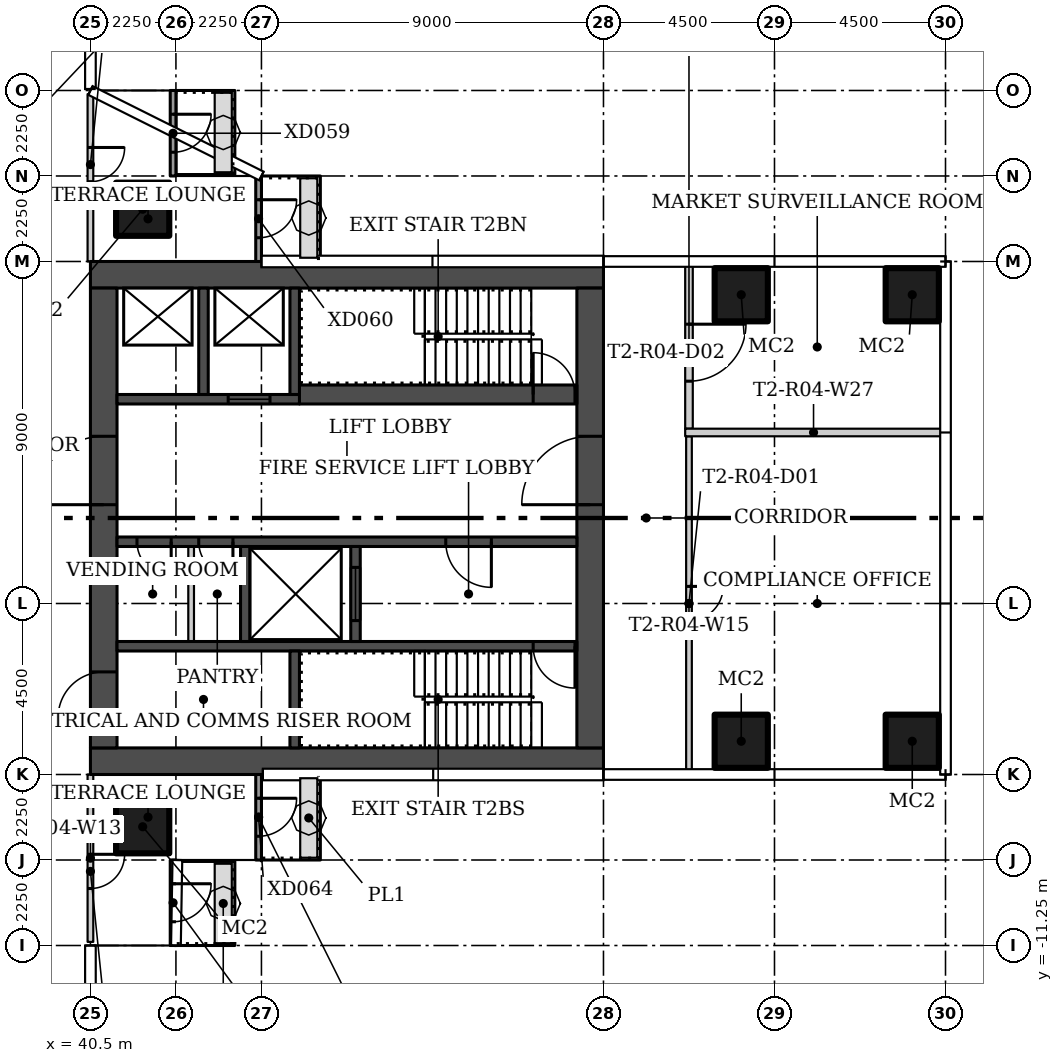
"""IFC4 building model, lengths in metres.
Left out: names, types, materials, properties, quantities, classifications, styles, units other than length and angle.
Written with IfcOpenShell. Run it as: python <this file> out.ifc"""

import sys

from ifc_helpers import new_model, si_unit, direction, frame, frame_2d, origin, origin_2d, place, context, subcontext, project, spatial, rectangle, hollow_rectangle, extrude, element, fill, save


model = new_model("IFC4")
c1 = context("Model", 3, precision=1e-05, world=origin(), true_north=direction((0.0, 1.0)))
c2 = subcontext(c1, "Body", "Model", "MODEL_VIEW")
j1 = project(units=[si_unit("LENGTHUNIT", "METRE"), si_unit("PLANEANGLEUNIT", "RADIAN")], contexts=[c1])
p1 = place(None, origin())
s1 = spatial("IfcSite", under=j1, at=p1, CompositionType="ELEMENT")
p2 = place(p1, origin())
s2 = spatial("IfcBuilding", under=s1, at=p2, CompositionType="ELEMENT")
p3 = place(p2, frame((0.0, 0.0, 49.8)))
s3 = spatial("IfcBuildingStorey", under=s2, at=p3, CompositionType="ELEMENT", Elevation=49.8)
for number, where in (
    (1, (41.875, 8.125, 0.0)),
    (2, (41.875, -8.125, 0.0)),
    (3, (57.625, -5.875, 0.0)),
    (4, (62.125, -5.875, 0.0)),
    (5, (57.625, 5.875, 0.0)),
    (6, (62.125, 5.875, 0.0)),
):
    element("IfcColumn", number, at=place(p3, frame(where)), inside=s3, PredefinedType="COLUMN", context=c2, shape_type="SweptSolid", body=[
        extrude(hollow_rectangle(XDim=1.4, YDim=1.4, WallThickness=0.05, at=origin_2d()), origin(), (0.0, 0.0, 1.0), 3.55),
    ])
p4 = place(p3, frame((40.5, -6.75, 0.0), z_axis=(0.0, 0.0, 1.0), x_axis=(0.0, -1.0, 0.0)))
e7 = element("IfcWall", 7, at=p4, inside=s3, PredefinedType="PARTITIONING", context=c2, shape_type="SweptSolid", body=[
    extrude(rectangle(XDim=4.405, YDim=0.15, at=frame_2d((2.203, 0.0))), origin(), (0.0, 0.0, 1.0), 3.55),
])
p5 = place(p4, frame((2.1, 0.0, 0.0)))
e8 = element("IfcOpeningElement", 8, at=p5, cuts=e7, PredefinedType="OPENING", context=c2, shape_type="SweptSolid", body=[
    extrude(rectangle(XDim=0.9, YDim=2.1, at=frame_2d((0.45, 1.05))), frame((0.0, 0.085, 0.0), z_axis=(0.0, -1.0, 0.0), x_axis=(1.0, 0.0, 0.0)), (0.0, 0.0, 1.0), 0.17),
])
p6 = place(p3, frame((40.5, 11.155, 0.0), z_axis=(0.0, 0.0, 1.0), x_axis=(0.0, -1.0, 0.0)))
e9 = element("IfcWall", 9, at=p6, inside=s3, PredefinedType="PARTITIONING", context=c2, shape_type="SweptSolid", body=[
    extrude(rectangle(XDim=4.405, YDim=0.15, at=frame_2d((2.203, 0.0))), origin(), (0.0, 0.0, 1.0), 3.55),
])
p7 = place(p6, frame((1.405, 0.0, 0.0)))
e10 = element("IfcOpeningElement", 10, at=p7, cuts=e9, PredefinedType="OPENING", context=c2, shape_type="SweptSolid", body=[
    extrude(rectangle(XDim=0.9, YDim=2.1, at=frame_2d((0.45, 1.05))), frame((0.0, 0.085, 0.0), z_axis=(0.0, -1.0, 0.0), x_axis=(1.0, 0.0, 0.0)), (0.0, 0.0, 1.0), 0.17),
])
p8 = place(p3, frame((56.25, 2.15, 0.0), z_axis=(0.0, 0.0, 1.0), x_axis=(0.0, -1.0, 0.0)))
e11 = element("IfcWall", 11, at=p8, inside=s3, PredefinedType="PARTITIONING", context=c2, shape_type="SweptSolid", body=[
    extrude(rectangle(XDim=8.805, YDim=0.15, at=frame_2d((4.402, 0.0))), origin(), (0.0, 0.0, 1.0), 3.55),
])
p9 = place(p8, frame((3.95, 0.0, 0.0)))
e12 = element("IfcOpeningElement", 12, at=p9, cuts=e11, PredefinedType="OPENING", context=c2, shape_type="SweptSolid", body=[
    extrude(rectangle(XDim=0.9, YDim=2.1, at=frame_2d((0.45, 1.05))), frame((0.0, 0.085, 0.0), z_axis=(0.0, -1.0, 0.0), x_axis=(1.0, 0.0, 0.0)), (0.0, 0.0, 1.0), 0.17),
])
p10 = place(p3, frame((56.25, 6.655, 0.0), z_axis=(0.0, 0.0, 1.0), x_axis=(0.0, -1.0, 0.0)))
e13 = element("IfcWall", 13, at=p10, inside=s3, PredefinedType="PARTITIONING", context=c2, shape_type="SweptSolid", body=[
    extrude(rectangle(XDim=4.305, YDim=0.2, at=frame_2d((2.152, 0.0))), origin(), (0.0, 0.0, 1.0), 3.55),
])
p11 = place(p10, frame((1.555, 0.0, 0.0)))
e14 = element("IfcOpeningElement", 14, at=p11, cuts=e13, PredefinedType="OPENING", context=c2, shape_type="SweptSolid", body=[
    extrude(rectangle(XDim=1.5, YDim=2.1, at=frame_2d((0.75, 1.05))), frame((0.0, 0.11, 0.0), z_axis=(0.0, -1.0, 0.0), x_axis=(1.0, 0.0, 0.0)), (0.0, 0.0, 1.0), 0.22),
])
p12 = place(p3, frame((62.905, 2.25, 0.0), z_axis=(0.0, 0.0, 1.0), x_axis=(-1.0, 0.0, 0.0)))
e15 = element("IfcWall", 15, at=p12, inside=s3, PredefinedType="PARTITIONING", context=c2, shape_type="SweptSolid", body=[
    extrude(rectangle(XDim=6.755, YDim=0.2, at=frame_2d((3.377, 0.0))), origin(), (0.0, 0.0, 1.0), 3.55),
])
p13 = place(p3, frame((42.675, 11.25, 0.0), z_axis=(0.0, 0.0, 1.0), x_axis=(0.0, -1.0, 0.0)))
e16 = element("IfcWall", 16, at=p13, inside=s3, PredefinedType="SOLIDWALL", context=c2, shape_type="SweptSolid", body=[
    extrude(rectangle(XDim=2.25, YDim=0.15, at=frame_2d((1.125, 0.0))), origin(), (0.0, 0.0, 1.0), 3.45),
])
p14 = place(p13, frame((0.625, 0.0, 0.0)))
e17 = element("IfcOpeningElement", 17, at=p14, cuts=e16, PredefinedType="OPENING", context=c2, shape_type="SweptSolid", body=[
    extrude(rectangle(XDim=1.0, YDim=2.4, at=frame_2d((0.5, 1.2))), frame((0.0, 0.085, 0.0), z_axis=(0.0, -1.0, 0.0), x_axis=(1.0, 0.0, 0.0)), (0.0, 0.0, 1.0), 0.17),
])
p15 = place(p3, frame((44.925, 9.0, 0.0), z_axis=(0.0, 0.0, 1.0), x_axis=(0.0, -1.0, 0.0)))
e18 = element("IfcWall", 18, at=p15, inside=s3, PredefinedType="SOLIDWALL", context=c2, shape_type="SweptSolid", body=[
    extrude(rectangle(XDim=2.257, YDim=0.15, at=frame_2d((1.128, 0.0))), origin(), (0.0, 0.0, 1.0), 3.45),
])
p16 = place(p15, frame((0.625, 0.0, 0.0)))
e19 = element("IfcOpeningElement", 19, at=p16, cuts=e18, PredefinedType="OPENING", context=c2, shape_type="SweptSolid", body=[
    extrude(rectangle(XDim=1.0, YDim=2.4, at=frame_2d((0.5, 1.2))), frame((0.0, 0.085, 0.0), z_axis=(0.0, -1.0, 0.0), x_axis=(1.0, 0.0, 0.0)), (0.0, 0.0, 1.0), 0.17),
])
p17 = place(p3, frame((42.675, -9.0, 0.0), z_axis=(0.0, 0.0, 1.0), x_axis=(0.0, -1.0, 0.0)))
e20 = element("IfcWall", 20, at=p17, inside=s3, PredefinedType="SOLIDWALL", context=c2, shape_type="SweptSolid", body=[
    extrude(rectangle(XDim=2.25, YDim=0.15, at=frame_2d((1.125, 0.0))), origin(), (0.0, 0.0, 1.0), 3.45),
])
p18 = place(p17, frame((0.625, 0.0, 0.0)))
e21 = element("IfcOpeningElement", 21, at=p18, cuts=e20, PredefinedType="OPENING", context=c2, shape_type="SweptSolid", body=[
    extrude(rectangle(XDim=1.0, YDim=2.4, at=frame_2d((0.5, 1.2))), frame((0.0, 0.085, 0.0), z_axis=(0.0, -1.0, 0.0), x_axis=(1.0, 0.0, 0.0)), (0.0, 0.0, 1.0), 0.17),
])
p19 = place(p3, frame((44.925, -6.743, 0.0), z_axis=(0.0, 0.0, 1.0), x_axis=(0.0, -1.0, 0.0)))
e22 = element("IfcWall", 22, at=p19, inside=s3, PredefinedType="SOLIDWALL", context=c2, shape_type="SweptSolid", body=[
    extrude(rectangle(XDim=2.257, YDim=0.15, at=frame_2d((1.128, 0.0))), origin(), (0.0, 0.0, 1.0), 3.45),
])
p20 = place(p19, frame((0.632, 0.0, 0.0)))
e23 = element("IfcOpeningElement", 23, at=p20, cuts=e22, PredefinedType="OPENING", context=c2, shape_type="SweptSolid", body=[
    extrude(rectangle(XDim=1.0, YDim=2.4, at=frame_2d((0.5, 1.2))), frame((0.0, 0.085, 0.0), z_axis=(0.0, -1.0, 0.0), x_axis=(1.0, 0.0, 0.0)), (0.0, 0.0, 1.0), 0.17),
])
for number, where, z_axis, x_axis in (
    (24, (54.0, -6.4, 0.0), (0.0, 0.0, 1.0), (-1.0, 0.0, 0.0)),
    (25, (54.0, 6.4, 0.0), (0.0, 0.0, 1.0), (-1.0, 0.0, 0.0)),
):
    element("IfcWall", number, at=place(p3, frame(where, z_axis=z_axis, x_axis=x_axis)), inside=s3, PredefinedType="SHEAR", context=c2, shape_type="SweptSolid", body=[
        extrude(rectangle(XDim=13.5, YDim=0.7, at=frame_2d((6.75, 0.0))), origin(), (0.0, 0.0, 1.0), 3.55),
    ])
p21 = place(p3, frame((53.65, -6.05, 0.0), z_axis=(0.0, 0.0, 1.0), x_axis=(0.0, 1.0, 0.0)))
e26 = element("IfcWall", 26, at=p21, inside=s3, PredefinedType="SHEAR", context=c2, shape_type="SweptSolid", body=[
    extrude(rectangle(XDim=12.1, YDim=0.7, at=frame_2d((6.05, 0.0))), origin(), (0.0, 0.0, 1.0), 3.55),
])
p22 = place(p21, frame((6.4, 0.0, 0.0)))
e27 = element("IfcOpeningElement", 27, at=p22, cuts=e26, PredefinedType="OPENING", context=c2, shape_type="SweptSolid", body=[
    extrude(rectangle(XDim=1.8, YDim=2.4, at=frame_2d((0.9, 1.2))), frame((0.0, 0.36, 0.0), z_axis=(0.0, -1.0, 0.0), x_axis=(1.0, 0.0, 0.0)), (0.0, 0.0, 1.0), 0.72),
])
p23 = place(p3, frame((40.85, -6.05, 0.0), z_axis=(0.0, 0.0, 1.0), x_axis=(0.0, 1.0, 0.0)))
e28 = element("IfcWall", 28, at=p23, inside=s3, PredefinedType="SHEAR", context=c2, shape_type="SweptSolid", body=[
    extrude(rectangle(XDim=12.1, YDim=0.7, at=frame_2d((6.05, 0.0))), origin(), (0.0, 0.0, 1.0), 3.55),
])
p24 = place(p23, frame((0.8, 0.0, 0.0)))
e29 = element("IfcOpeningElement", 29, at=p24, cuts=e28, PredefinedType="OPENING", context=c2, shape_type="SweptSolid", body=[
    extrude(rectangle(XDim=1.2, YDim=2.1, at=frame_2d((0.6, 1.05))), frame((0.0, 0.36, 0.0), z_axis=(0.0, -1.0, 0.0), x_axis=(1.0, 0.0, 0.0)), (0.0, 0.0, 1.0), 0.72),
])
p25 = place(p23, frame((6.4, 0.0, 0.0)))
e30 = element("IfcOpeningElement", 30, at=p25, cuts=e28, PredefinedType="OPENING", context=c2, shape_type="SweptSolid", body=[
    extrude(rectangle(XDim=1.8, YDim=2.4, at=frame_2d((0.9, 1.2))), frame((0.0, 0.36, 0.0), z_axis=(0.0, -1.0, 0.0), x_axis=(1.0, 0.0, 0.0)), (0.0, 0.0, 1.0), 0.72),
])
p26 = place(p3, frame((53.3, -3.375, 0.0), z_axis=(0.0, 0.0, 1.0), x_axis=(-1.0, 0.0, 0.0)))
e31 = element("IfcWall", 31, at=p26, inside=s3, PredefinedType="SHEAR", context=c2, shape_type="SweptSolid", body=[
    extrude(rectangle(XDim=12.1, YDim=0.25, at=frame_2d((6.05, 0.0))), origin(), (0.0, 0.0, 1.0), 3.55),
])
p27 = place(p26, frame((0.05, 0.0, 0.0)))
e32 = element("IfcOpeningElement", 32, at=p27, cuts=e31, PredefinedType="OPENING", context=c2, shape_type="SweptSolid", body=[
    extrude(rectangle(XDim=1.1, YDim=2.1, at=frame_2d((0.55, 1.05))), frame((0.0, 0.135, 0.0), z_axis=(0.0, -1.0, 0.0), x_axis=(1.0, 0.0, 0.0)), (0.0, 0.0, 1.0), 0.27),
])
p28 = place(p3, frame((45.875, -6.05, 0.0), z_axis=(0.0, 0.0, 1.0), x_axis=(0.0, 1.0, 0.0)))
e33 = element("IfcWall", 33, at=p28, inside=s3, PredefinedType="SHEAR", context=c2, shape_type="SweptSolid", body=[
    extrude(rectangle(XDim=2.55, YDim=0.25, at=frame_2d((1.275, 0.0))), origin(), (0.0, 0.0, 1.0), 3.55),
])
p29 = place(p3, frame((53.3, -0.625, 0.0), z_axis=(0.0, 0.0, 1.0), x_axis=(-1.0, 0.0, 0.0)))
e34 = element("IfcWall", 34, at=p29, inside=s3, PredefinedType="SHEAR", context=c2, shape_type="SweptSolid", body=[
    extrude(rectangle(XDim=12.1, YDim=0.25, at=frame_2d((6.05, 0.0))), origin(), (0.0, 0.0, 1.0), 3.55),
])
p30 = place(p29, frame((2.25, 0.0, 0.0)))
e35 = element("IfcOpeningElement", 35, at=p30, cuts=e34, PredefinedType="OPENING", context=c2, shape_type="SweptSolid", body=[
    extrude(rectangle(XDim=1.2, YDim=2.1, at=frame_2d((0.6, 1.05))), frame((0.0, 0.135, 0.0), z_axis=(0.0, -1.0, 0.0), x_axis=(1.0, 0.0, 0.0)), (0.0, 0.0, 1.0), 0.27),
])
p31 = place(p29, frame((9.05, 0.0, 0.0)))
e36 = element("IfcOpeningElement", 36, at=p31, cuts=e34, PredefinedType="OPENING", context=c2, shape_type="SweptSolid", body=[
    extrude(rectangle(XDim=0.9, YDim=2.1, at=frame_2d((0.45, 1.05))), frame((0.0, 0.135, 0.0), z_axis=(0.0, -1.0, 0.0), x_axis=(1.0, 0.0, 0.0)), (0.0, 0.0, 1.0), 0.27),
])
p32 = place(p29, frame((10.675, 0.0, 0.0)))
e37 = element("IfcOpeningElement", 37, at=p32, cuts=e34, PredefinedType="OPENING", context=c2, shape_type="SweptSolid", body=[
    extrude(rectangle(XDim=0.9, YDim=2.1, at=frame_2d((0.45, 1.05))), frame((0.0, 0.135, 0.0), z_axis=(0.0, -1.0, 0.0), x_axis=(1.0, 0.0, 0.0)), (0.0, 0.0, 1.0), 0.27),
])
p33 = place(p3, frame((47.475, -3.25, 0.0), z_axis=(0.0, 0.0, 1.0), x_axis=(0.0, 1.0, 0.0)))
e38 = element("IfcWall", 38, at=p33, inside=s3, PredefinedType="SHEAR", context=c2, shape_type="SweptSolid", body=[
    extrude(rectangle(XDim=2.5, YDim=0.25, at=frame_2d((1.25, 0.0))), origin(), (0.0, 0.0, 1.0), 3.55),
])
p34 = place(p33, frame((0.55, 0.0, 0.0)))
e39 = element("IfcOpeningElement", 39, at=p34, cuts=e38, PredefinedType="OPENING", context=c2, shape_type="SweptSolid", body=[
    extrude(rectangle(XDim=1.4, YDim=2.4, at=frame_2d((0.7, 1.2))), frame((0.0, 0.135, 0.0), z_axis=(0.0, -1.0, 0.0), x_axis=(1.0, 0.0, 0.0)), (0.0, 0.0, 1.0), 0.27),
])
p35 = place(p3, frame((44.575, -3.25, 0.0), z_axis=(0.0, 0.0, 1.0), x_axis=(0.0, 1.0, 0.0)))
e40 = element("IfcWall", 40, at=p35, inside=s3, PredefinedType="SHEAR", context=c2, shape_type="SweptSolid", body=[
    extrude(rectangle(XDim=2.5, YDim=0.25, at=frame_2d((1.25, 0.0))), origin(), (0.0, 0.0, 1.0), 3.55),
])
p36 = place(p3, frame((43.15, -3.25, 0.0), z_axis=(0.0, 0.0, 1.0), x_axis=(0.0, 1.0, 0.0)))
e41 = element("IfcWall", 41, at=p36, inside=s3, PredefinedType="PARTITIONING", context=c2, shape_type="SweptSolid", body=[
    extrude(rectangle(XDim=2.5, YDim=0.15, at=frame_2d((1.25, 0.0))), origin(), (0.0, 0.0, 1.0), 3.55),
])
p37 = place(p3, frame((46.0, 3.25, 0.0)))
e42 = element("IfcWall", 42, at=p37, inside=s3, PredefinedType="SHEAR", context=c2, shape_type="SweptSolid", body=[
    extrude(rectangle(XDim=7.3, YDim=0.5, at=frame_2d((3.65, 0.0))), origin(), (0.0, 0.0, 1.0), 3.55),
])
p38 = place(p37, frame((6.15, 0.0, 0.0)))
e43 = element("IfcOpeningElement", 43, at=p38, cuts=e42, PredefinedType="OPENING", context=c2, shape_type="SweptSolid", body=[
    extrude(rectangle(XDim=1.1, YDim=2.1, at=frame_2d((0.55, 1.05))), frame((0.0, 0.26, 0.0), z_axis=(0.0, -1.0, 0.0), x_axis=(1.0, 0.0, 0.0)), (0.0, 0.0, 1.0), 0.52),
])
p39 = place(p3, frame((46.0, 3.125, 0.0), z_axis=(0.0, 0.0, 1.0), x_axis=(-1.0, 0.0, 0.0)))
e44 = element("IfcWall", 44, at=p39, inside=s3, PredefinedType="SHEAR", context=c2, shape_type="SweptSolid", body=[
    extrude(rectangle(XDim=4.8, YDim=0.25, at=frame_2d((2.4, 0.0))), origin(), (0.0, 0.0, 1.0), 3.55),
])
p40 = place(p39, frame((0.775, 0.0, 0.0)))
e45 = element("IfcOpeningElement", 45, at=p40, cuts=e44, PredefinedType="OPENING", context=c2, shape_type="SweptSolid", body=[
    extrude(rectangle(XDim=1.1, YDim=2.1, at=frame_2d((0.55, 1.05))), frame((0.0, 0.135, 0.0), z_axis=(0.0, -1.0, 0.0), x_axis=(1.0, 0.0, 0.0)), (0.0, 0.0, 1.0), 0.27),
])
for number, where, z_axis, x_axis in (
    (46, (45.875, 3.25, 0.0), (0.0, 0.0, 1.0), (0.0, 1.0, 0.0)),
    (47, (43.475, 3.25, 0.0), (0.0, 0.0, 1.0), (0.0, 1.0, 0.0)),
):
    element("IfcWall", number, at=place(p3, frame(where, z_axis=z_axis, x_axis=x_axis)), inside=s3, PredefinedType="SHEAR", context=c2, shape_type="SweptSolid", body=[
        extrude(rectangle(XDim=2.8, YDim=0.25, at=frame_2d((1.4, 0.0))), origin(), (0.0, 0.0, 1.0), 3.55),
    ])
p41 = place(p9, origin())
e48 = element("IfcDoor", 48, at=p41, inside=s3, OperationType="SINGLE_SWING_LEFT", PredefinedType="DOOR", context=c2, shape_type="SweptSolid", body=[
    extrude(rectangle(XDim=0.9, YDim=2.1, at=frame_2d((0.45, 1.05))), frame((0.0, 0.025, 0.0), z_axis=(0.0, -1.0, 0.0), x_axis=(1.0, 0.0, 0.0)), (0.0, 0.0, 1.0), 0.05),
])
fill(e12, e48)
p42 = place(p11, origin())
e49 = element("IfcDoor", 49, at=p42, inside=s3, OperationType="DOUBLE_DOOR_SINGLE_SWING", PredefinedType="DOOR", context=c2, shape_type="SweptSolid", body=[
    extrude(rectangle(XDim=1.5, YDim=2.1, at=frame_2d((0.75, 1.05))), frame((0.0, 0.025, 0.0), z_axis=(0.0, -1.0, 0.0), x_axis=(1.0, 0.0, 0.0)), (0.0, 0.0, 1.0), 0.05),
])
fill(e14, e49)
p43 = place(p5, origin())
e50 = element("IfcDoor", 50, at=p43, inside=s3, OperationType="SINGLE_SWING_RIGHT", PredefinedType="DOOR", context=c2, shape_type="SweptSolid", body=[
    extrude(rectangle(XDim=0.9, YDim=2.1, at=frame_2d((0.45, 1.05))), frame((0.0, 0.025, 0.0), z_axis=(0.0, -1.0, 0.0), x_axis=(1.0, 0.0, 0.0)), (0.0, 0.0, 1.0), 0.05),
])
fill(e8, e50)
p44 = place(p7, origin())
e51 = element("IfcDoor", 51, at=p44, inside=s3, OperationType="SINGLE_SWING_LEFT", PredefinedType="DOOR", context=c2, shape_type="SweptSolid", body=[
    extrude(rectangle(XDim=0.9, YDim=2.1, at=frame_2d((0.45, 1.05))), frame((0.0, 0.025, 0.0), z_axis=(0.0, -1.0, 0.0), x_axis=(1.0, 0.0, 0.0)), (0.0, 0.0, 1.0), 0.05),
])
fill(e10, e51)
p45 = place(p14, origin())
e52 = element("IfcDoor", 52, at=p45, inside=s3, OperationType="SINGLE_SWING_RIGHT", PredefinedType="DOOR", context=c2, shape_type="SweptSolid", body=[
    extrude(rectangle(XDim=1.0, YDim=2.4, at=frame_2d((0.5, 1.2))), frame((0.0, 0.025, 0.0), z_axis=(0.0, -1.0, 0.0), x_axis=(1.0, 0.0, 0.0)), (0.0, 0.0, 1.0), 0.05),
])
fill(e17, e52)
p46 = place(p16, origin())
e53 = element("IfcDoor", 53, at=p46, inside=s3, OperationType="SINGLE_SWING_LEFT", PredefinedType="DOOR", context=c2, shape_type="SweptSolid", body=[
    extrude(rectangle(XDim=1.0, YDim=2.4, at=frame_2d((0.5, 1.2))), frame((0.0, 0.025, 0.0), z_axis=(0.0, -1.0, 0.0), x_axis=(1.0, 0.0, 0.0)), (0.0, 0.0, 1.0), 0.05),
])
fill(e19, e53)
p47 = place(p18, origin())
e54 = element("IfcDoor", 54, at=p47, inside=s3, OperationType="SINGLE_SWING_LEFT", PredefinedType="DOOR", context=c2, shape_type="SweptSolid", body=[
    extrude(rectangle(XDim=1.0, YDim=2.4, at=frame_2d((0.5, 1.2))), frame((0.0, 0.025, 0.0), z_axis=(0.0, -1.0, 0.0), x_axis=(1.0, 0.0, 0.0)), (0.0, 0.0, 1.0), 0.05),
])
fill(e21, e54)
p48 = place(p20, origin())
e55 = element("IfcDoor", 55, at=p48, inside=s3, OperationType="SINGLE_SWING_RIGHT", PredefinedType="DOOR", context=c2, shape_type="SweptSolid", body=[
    extrude(rectangle(XDim=1.0, YDim=2.4, at=frame_2d((0.5, 1.2))), frame((0.0, 0.025, 0.0), z_axis=(0.0, -1.0, 0.0), x_axis=(1.0, 0.0, 0.0)), (0.0, 0.0, 1.0), 0.05),
])
fill(e23, e55)
p49 = place(p22, origin())
e56 = element("IfcDoor", 56, at=p49, inside=s3, OperationType="DOUBLE_DOOR_SINGLE_SWING", PredefinedType="DOOR", context=c2, shape_type="SweptSolid", body=[
    extrude(rectangle(XDim=1.8, YDim=2.4, at=frame_2d((0.9, 1.2))), frame((0.0, 0.025, 0.0), z_axis=(0.0, -1.0, 0.0), x_axis=(1.0, 0.0, 0.0)), (0.0, 0.0, 1.0), 0.05),
])
fill(e27, e56)
p50 = place(p24, origin())
e57 = element("IfcDoor", 57, at=p50, inside=s3, OperationType="SINGLE_SWING_LEFT", PredefinedType="DOOR", context=c2, shape_type="SweptSolid", body=[
    extrude(rectangle(XDim=1.2, YDim=2.1, at=frame_2d((0.6, 1.05))), frame((0.0, 0.025, 0.0), z_axis=(0.0, -1.0, 0.0), x_axis=(1.0, 0.0, 0.0)), (0.0, 0.0, 1.0), 0.05),
])
fill(e29, e57)
p51 = place(p25, origin())
e58 = element("IfcDoor", 58, at=p51, inside=s3, OperationType="DOUBLE_DOOR_SINGLE_SWING", PredefinedType="DOOR", context=c2, shape_type="SweptSolid", body=[
    extrude(rectangle(XDim=1.8, YDim=2.4, at=frame_2d((0.9, 1.2))), frame((0.0, 0.025, 0.0), z_axis=(0.0, -1.0, 0.0), x_axis=(1.0, 0.0, 0.0)), (0.0, 0.0, 1.0), 0.05),
])
fill(e30, e58)
p52 = place(p27, origin())
e59 = element("IfcDoor", 59, at=p52, inside=s3, OperationType="SINGLE_SWING_LEFT", PredefinedType="DOOR", context=c2, shape_type="SweptSolid", body=[
    extrude(rectangle(XDim=1.1, YDim=2.1, at=frame_2d((0.55, 1.05))), frame((0.0, 0.025, 0.0), z_axis=(0.0, -1.0, 0.0), x_axis=(1.0, 0.0, 0.0)), (0.0, 0.0, 1.0), 0.05),
])
fill(e32, e59)
p53 = place(p30, origin())
e60 = element("IfcDoor", 60, at=p53, inside=s3, OperationType="SINGLE_SWING_LEFT", PredefinedType="DOOR", context=c2, shape_type="SweptSolid", body=[
    extrude(rectangle(XDim=1.2, YDim=2.1, at=frame_2d((0.6, 1.05))), frame((0.0, 0.025, 0.0), z_axis=(0.0, -1.0, 0.0), x_axis=(1.0, 0.0, 0.0)), (0.0, 0.0, 1.0), 0.05),
])
fill(e35, e60)
p54 = place(p31, origin())
e61 = element("IfcDoor", 61, at=p54, inside=s3, OperationType="SINGLE_SWING_RIGHT", PredefinedType="DOOR", context=c2, shape_type="SweptSolid", body=[
    extrude(rectangle(XDim=0.9, YDim=2.1, at=frame_2d((0.45, 1.05))), frame((0.0, 0.025, 0.0), z_axis=(0.0, -1.0, 0.0), x_axis=(1.0, 0.0, 0.0)), (0.0, 0.0, 1.0), 0.05),
])
fill(e36, e61)
p55 = place(p32, origin())
e62 = element("IfcDoor", 62, at=p55, inside=s3, OperationType="SINGLE_SWING_RIGHT", PredefinedType="DOOR", context=c2, shape_type="SweptSolid", body=[
    extrude(rectangle(XDim=0.9, YDim=2.1, at=frame_2d((0.45, 1.05))), frame((0.0, 0.025, 0.0), z_axis=(0.0, -1.0, 0.0), x_axis=(1.0, 0.0, 0.0)), (0.0, 0.0, 1.0), 0.05),
])
fill(e37, e62)
p56 = place(p34, origin())
e63 = element("IfcDoor", 63, at=p56, inside=s3, OperationType="SLIDING_TO_LEFT", PredefinedType="DOOR", context=c2, shape_type="SweptSolid", body=[
    extrude(rectangle(XDim=1.4, YDim=2.4, at=frame_2d((0.7, 1.2))), frame((0.0, 0.025, 0.0), z_axis=(0.0, -1.0, 0.0), x_axis=(1.0, 0.0, 0.0)), (0.0, 0.0, 1.0), 0.05),
])
fill(e39, e63)
p57 = place(p38, origin())
e64 = element("IfcDoor", 64, at=p57, inside=s3, OperationType="SINGLE_SWING_RIGHT", PredefinedType="DOOR", context=c2, shape_type="SweptSolid", body=[
    extrude(rectangle(XDim=1.1, YDim=2.1, at=frame_2d((0.55, 1.05))), frame((0.0, 0.025, 0.0), z_axis=(0.0, -1.0, 0.0), x_axis=(1.0, 0.0, 0.0)), (0.0, 0.0, 1.0), 0.05),
])
fill(e43, e64)
p58 = place(p40, origin())
e65 = element("IfcDoor", 65, at=p58, inside=s3, OperationType="SLIDING_TO_LEFT", PredefinedType="DOOR", context=c2, shape_type="SweptSolid", body=[
    extrude(rectangle(XDim=1.1, YDim=2.1, at=frame_2d((0.55, 1.05))), frame((0.0, 0.025, 0.0), z_axis=(0.0, -1.0, 0.0), x_axis=(1.0, 0.0, 0.0)), (0.0, 0.0, 1.0), 0.05),
])
fill(e45, e65)
save(model, sys.argv[1])
